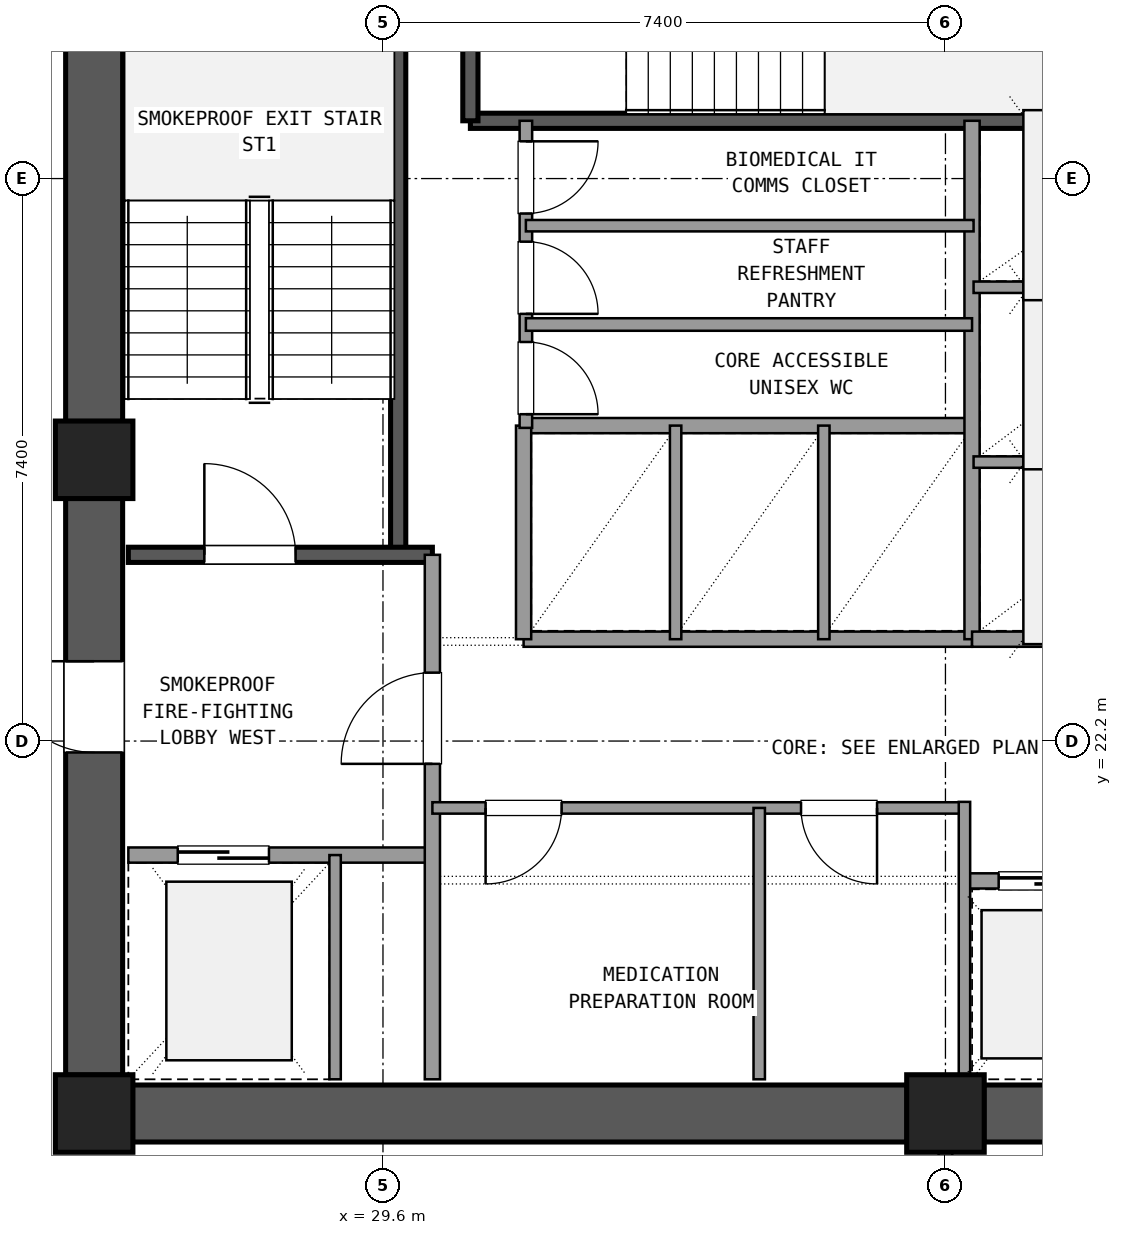
"""IFC4 building model, lengths in metres.
Left out: names, types, materials, properties, quantities, classifications, styles, units other than length and angle.
Written with IfcOpenShell. Run it as: python <this file> out.ifc"""

import sys

from ifc_helpers import new_model, si_unit, direction, frame, frame_2d, origin, origin_2d, place, context, subcontext, project, spatial, rectangle, extrude, element, fill, save


model = new_model("IFC4")
c1 = context("Model", 3, precision=1e-05, world=origin(), true_north=direction((0.0, 1.0)))
c2 = subcontext(c1, "Body", "Model", "MODEL_VIEW")
j1 = project(units=[si_unit("LENGTHUNIT", "METRE"), si_unit("PLANEANGLEUNIT", "RADIAN")], contexts=[c1])
p1 = place(None, origin())
s1 = spatial("IfcSite", under=j1, at=p1, CompositionType="ELEMENT")
p2 = place(p1, origin())
s2 = spatial("IfcBuilding", under=s1, at=p2, CompositionType="ELEMENT")
p3 = place(p2, frame((0.0, 0.0, 142.02)))
s3 = spatial("IfcBuildingStorey", under=s2, at=p3, CompositionType="ELEMENT", Elevation=142.02)
for number, where, z_axis, x_axis in (
    (1, (25.8, 17.3, 0.0), (0.0, 0.0, 1.0), (1.0, 0.0, 0.0)),
    (2, (37.0, 17.3, 0.0), (0.0, 0.0, 1.0), (1.0, 0.0, 0.0)),
    (3, (25.8, 25.9, 0.0), (0.0, 0.0, 1.0), (1.0, 0.0, 0.0)),
):
    element("IfcColumn", number, at=place(p3, frame(where, z_axis=z_axis, x_axis=x_axis)), inside=s3, PredefinedType="COLUMN", context=c2, shape_type="SweptSolid", body=[
        extrude(rectangle(XDim=1.02, YDim=1.02, at=origin_2d()), origin(), (0.0, 0.0, 1.0), 3.6),
    ])
for number, where, z_axis, x_axis in (
    (4, (26.305, 17.3, 0.0), (0.0, 0.0, 1.0), (1.0, 0.0, 0.0)),
    (5, (37.505, 17.3, 0.0), (0.0, 0.0, 1.0), (1.0, 0.0, 0.0)),
):
    element("IfcWall", number, at=place(p3, frame(where, z_axis=z_axis, x_axis=x_axis)), inside=s3, PredefinedType="SHEAR", context=c2, shape_type="SweptSolid", body=[
        extrude(rectangle(XDim=10.19, YDim=0.75, at=frame_2d((5.095, 0.0))), origin(), (0.0, 0.0, 1.0), 3.32),
    ])
p4 = place(p3, frame((25.8, 33.995, 0.0), z_axis=(0.0, 0.0, 1.0), x_axis=(0.0, -1.0, 0.0)))
e6 = element("IfcWall", 6, at=p4, inside=s3, PredefinedType="SHEAR", context=c2, shape_type="SweptSolid", body=[
    extrude(rectangle(XDim=7.59, YDim=0.75, at=frame_2d((3.795, 0.0))), origin(), (0.0, 0.0, 1.0), 3.32),
])
p5 = place(p3, frame((25.8, 25.395, 0.0), z_axis=(0.0, 0.0, 1.0), x_axis=(0.0, -1.0, 0.0)))
e7 = element("IfcWall", 7, at=p5, inside=s3, PredefinedType="SHEAR", context=c2, shape_type="SweptSolid", body=[
    extrude(rectangle(XDim=7.59, YDim=0.75, at=frame_2d((3.795, 0.0))), origin(), (0.0, 0.0, 1.0), 3.32),
])
p6 = place(p5, frame((2.145, 0.0, 0.0)))
e8 = element("IfcOpeningElement", 8, at=p6, cuts=e7, PredefinedType="OPENING", context=c2, shape_type="SweptSolid", body=[
    extrude(rectangle(XDim=1.2, YDim=2.15, at=frame_2d((0.6, 1.075))), frame((0.0, 0.385, 0.0), z_axis=(0.0, -1.0, 0.0), x_axis=(1.0, 0.0, 0.0)), (0.0, 0.0, 1.0), 0.77),
])
p7 = place(p3, frame((29.8, 24.65, 0.0), z_axis=(0.0, 0.0, 1.0), x_axis=(0.0, 1.0, 0.0)))
e9 = element("IfcWall", 9, at=p7, inside=s3, PredefinedType="SHEAR", context=c2, shape_type="SweptSolid", body=[
    extrude(rectangle(XDim=9.4, YDim=0.2, at=frame_2d((4.7, 0.0))), origin(), (0.0, 0.0, 1.0), 3.32),
])
p8 = place(p3, frame((26.25, 24.65, 0.0), z_axis=(0.0, 0.0, 1.0), x_axis=(1.0, 0.0, 0.0)))
e10 = element("IfcWall", 10, at=p8, inside=s3, PredefinedType="SHEAR", context=c2, shape_type="SweptSolid", body=[
    extrude(rectangle(XDim=4.0, YDim=0.2, at=frame_2d((2.0, 0.0))), origin(), (0.0, 0.0, 1.0), 3.32),
])
p9 = place(p8, frame((1.0, 0.0, 0.0)))
e11 = element("IfcOpeningElement", 11, at=p9, cuts=e10, PredefinedType="OPENING", context=c2, shape_type="SweptSolid", body=[
    extrude(rectangle(XDim=1.2, YDim=2.15, at=frame_2d((0.6, 1.075))), frame((0.0, 0.11, 0.0), z_axis=(0.0, -1.0, 0.0), x_axis=(1.0, 0.0, 0.0)), (0.0, 0.0, 1.0), 0.22),
])
p10 = place(p3, frame((30.75, 30.36, 0.0), z_axis=(0.0, 0.0, 1.0), x_axis=(1.0, 0.0, 0.0)))
e12 = element("IfcWall", 12, at=p10, inside=s3, PredefinedType="SHEAR", context=c2, shape_type="SweptSolid", body=[
    extrude(rectangle(XDim=9.5, YDim=0.2, at=frame_2d((4.75, 0.0))), origin(), (0.0, 0.0, 1.0), 3.32),
])
p11 = place(p3, frame((30.75, 30.36, 0.0), z_axis=(0.0, 0.0, 1.0), x_axis=(0.0, 1.0, 0.0)))
e13 = element("IfcWall", 13, at=p11, inside=s3, PredefinedType="SHEAR", context=c2, shape_type="SweptSolid", body=[
    extrude(rectangle(XDim=3.69, YDim=0.2, at=frame_2d((1.845, 0.0))), origin(), (0.0, 0.0, 1.0), 3.32),
])
p12 = place(p3, frame((26.25, 20.7, 0.0), z_axis=(0.0, 0.0, 1.0), x_axis=(1.0, 0.0, 0.0)))
e14 = element("IfcWall", 14, at=p12, inside=s3, PredefinedType="SOLIDWALL", context=c2, shape_type="SweptSolid", body=[
    extrude(rectangle(XDim=4.0, YDim=0.2, at=frame_2d((2.0, 0.0))), origin(), (0.0, 0.0, 1.0), 2.61),
])
p13 = place(p12, frame((0.65, 0.0, 0.0)))
e15 = element("IfcOpeningElement", 15, at=p13, cuts=e14, PredefinedType="OPENING", context=c2, shape_type="SweptSolid", body=[
    extrude(rectangle(XDim=1.2, YDim=2.15, at=frame_2d((0.6, 1.075))), frame((0.0, 0.11, 0.0), z_axis=(0.0, -1.0, 0.0), x_axis=(1.0, 0.0, 0.0)), (0.0, 0.0, 1.0), 0.22),
])
p14 = place(p3, frame((30.25, 17.75, 0.0), z_axis=(0.0, 0.0, 1.0), x_axis=(0.0, 1.0, 0.0)))
e16 = element("IfcWall", 16, at=p14, inside=s3, PredefinedType="SOLIDWALL", context=c2, shape_type="SweptSolid", body=[
    extrude(rectangle(XDim=6.9, YDim=0.2, at=frame_2d((3.45, 0.0))), origin(), (0.0, 0.0, 1.0), 2.61),
])
p15 = place(p14, frame((4.15, 0.0, 0.0)))
e17 = element("IfcOpeningElement", 17, at=p15, cuts=e16, PredefinedType="OPENING", context=c2, shape_type="SweptSolid", body=[
    extrude(rectangle(XDim=1.2, YDim=2.15, at=frame_2d((0.6, 1.075))), frame((0.0, 0.11, 0.0), z_axis=(0.0, -1.0, 0.0), x_axis=(1.0, 0.0, 0.0)), (0.0, 0.0, 1.0), 0.22),
])
p16 = place(p3, frame((28.97, 17.75, 0.0), z_axis=(0.0, 0.0, 1.0), x_axis=(0.0, 1.0, 0.0)))
e18 = element("IfcWall", 18, at=p16, inside=s3, PredefinedType="PARTITIONING", context=c2, shape_type="SweptSolid", body=[
    extrude(rectangle(XDim=2.95, YDim=0.15, at=frame_2d((1.475, 0.0))), origin(), (0.0, 0.0, 1.0), 2.61),
])
p17 = place(p3, frame((30.25, 21.32, 0.0), z_axis=(0.0, 0.0, 1.0), x_axis=(1.0, 0.0, 0.0)))
e19 = element("IfcWall", 19, at=p17, inside=s3, PredefinedType="PARTITIONING", context=c2, shape_type="SweptSolid", body=[
    extrude(rectangle(XDim=7.0, YDim=0.15, at=frame_2d((3.5, 0.0))), origin(), (0.0, 0.0, 1.0), 2.61),
])
p18 = place(p17, frame((0.7, 0.0, 0.0)))
e20 = element("IfcOpeningElement", 20, at=p18, cuts=e19, PredefinedType="OPENING", context=c2, shape_type="SweptSolid", body=[
    extrude(rectangle(XDim=1.0, YDim=2.15, at=frame_2d((0.5, 1.075))), frame((0.0, 0.085, 0.0), z_axis=(0.0, -1.0, 0.0), x_axis=(1.0, 0.0, 0.0)), (0.0, 0.0, 1.0), 0.17),
])
p19 = place(p17, frame((4.85, 0.0, 0.0)))
e21 = element("IfcOpeningElement", 21, at=p19, cuts=e19, PredefinedType="OPENING", context=c2, shape_type="SweptSolid", body=[
    extrude(rectangle(XDim=1.0, YDim=2.15, at=frame_2d((0.5, 1.075))), frame((0.0, 0.085, 0.0), z_axis=(0.0, -1.0, 0.0), x_axis=(1.0, 0.0, 0.0)), (0.0, 0.0, 1.0), 0.17),
])
p20 = place(p3, frame((34.55, 17.75, 0.0), z_axis=(0.0, 0.0, 1.0), x_axis=(0.0, 1.0, 0.0)))
e22 = element("IfcWall", 22, at=p20, inside=s3, PredefinedType="PARTITIONING", context=c2, shape_type="SweptSolid", body=[
    extrude(rectangle(XDim=3.57, YDim=0.15, at=frame_2d((1.785, 0.0))), origin(), (0.0, 0.0, 1.0), 2.61),
])
p21 = place(p3, frame((37.25, 20.36, 0.0), z_axis=(0.0, 0.0, 1.0), x_axis=(1.0, 0.0, 0.0)))
e23 = element("IfcWall", 23, at=p21, inside=s3, PredefinedType="SOLIDWALL", context=c2, shape_type="SweptSolid", body=[
    extrude(rectangle(XDim=6.1, YDim=0.2, at=frame_2d((3.05, 0.0))), origin(), (0.0, 0.0, 1.0), 2.61),
])
p22 = place(p21, frame((0.45, 0.0, 0.0)))
e24 = element("IfcOpeningElement", 24, at=p22, cuts=e23, PredefinedType="OPENING", context=c2, shape_type="SweptSolid", body=[
    extrude(rectangle(XDim=1.1, YDim=2.15, at=frame_2d((0.55, 1.075))), frame((0.0, 0.11, 0.0), z_axis=(0.0, -1.0, 0.0), x_axis=(1.0, 0.0, 0.0)), (0.0, 0.0, 1.0), 0.22),
])
p23 = place(p21, frame((2.5, 0.0, 0.0)))
e25 = element("IfcOpeningElement", 25, at=p23, cuts=e23, PredefinedType="OPENING", context=c2, shape_type="SweptSolid", body=[
    extrude(rectangle(XDim=1.1, YDim=2.15, at=frame_2d((0.55, 1.075))), frame((0.0, 0.11, 0.0), z_axis=(0.0, -1.0, 0.0), x_axis=(1.0, 0.0, 0.0)), (0.0, 0.0, 1.0), 0.22),
])
p24 = place(p21, frame((4.55, 0.0, 0.0)))
e26 = element("IfcOpeningElement", 26, at=p24, cuts=e23, PredefinedType="OPENING", context=c2, shape_type="SweptSolid", body=[
    extrude(rectangle(XDim=1.1, YDim=2.15, at=frame_2d((0.55, 1.075))), frame((0.0, 0.11, 0.0), z_axis=(0.0, -1.0, 0.0), x_axis=(1.0, 0.0, 0.0)), (0.0, 0.0, 1.0), 0.22),
])
p25 = place(p3, frame((37.25, 17.75, 0.0), z_axis=(0.0, 0.0, 1.0), x_axis=(0.0, 1.0, 0.0)))
e27 = element("IfcWall", 27, at=p25, inside=s3, PredefinedType="PARTITIONING", context=c2, shape_type="SweptSolid", body=[
    extrude(rectangle(XDim=3.65, YDim=0.15, at=frame_2d((1.825, 0.0))), origin(), (0.0, 0.0, 1.0), 2.61),
])
for number, where, z_axis, x_axis in (
    (28, (31.45, 23.54, 0.0), (0.0, 0.0, 1.0), (1.0, 0.0, 0.0)),
    (29, (31.45, 26.35, 0.0), (0.0, 0.0, 1.0), (1.0, 0.0, 0.0)),
):
    element("IfcWall", number, at=place(p3, frame(where, z_axis=z_axis, x_axis=x_axis)), inside=s3, PredefinedType="SOLIDWALL", context=c2, shape_type="SweptSolid", body=[
        extrude(rectangle(XDim=5.9, YDim=0.2, at=frame_2d((2.95, 0.0))), origin(), (0.0, 0.0, 1.0), 2.61),
    ])
p26 = place(p3, frame((31.45, 23.54, 0.0), z_axis=(0.0, 0.0, 1.0), x_axis=(0.0, 1.0, 0.0)))
e30 = element("IfcWall", 30, at=p26, inside=s3, PredefinedType="SOLIDWALL", context=c2, shape_type="SweptSolid", body=[
    extrude(rectangle(XDim=2.81, YDim=0.2, at=frame_2d((1.405, 0.0))), origin(), (0.0, 0.0, 1.0), 2.61),
])
for number, where, z_axis, x_axis in (
    (31, (33.45, 23.54, 0.0), (0.0, 0.0, 1.0), (0.0, 1.0, 0.0)),
    (32, (35.4, 23.54, 0.0), (0.0, 0.0, 1.0), (0.0, 1.0, 0.0)),
):
    element("IfcWall", number, at=place(p3, frame(where, z_axis=z_axis, x_axis=x_axis)), inside=s3, PredefinedType="PARTITIONING", context=c2, shape_type="SweptSolid", body=[
        extrude(rectangle(XDim=2.81, YDim=0.15, at=frame_2d((1.405, 0.0))), origin(), (0.0, 0.0, 1.0), 2.61),
    ])
p27 = place(p3, frame((37.35, 23.54, 0.0), z_axis=(0.0, 0.0, 1.0), x_axis=(0.0, 1.0, 0.0)))
e33 = element("IfcWall", 33, at=p27, inside=s3, PredefinedType="SOLIDWALL", context=c2, shape_type="SweptSolid", body=[
    extrude(rectangle(XDim=6.82, YDim=0.2, at=frame_2d((3.41, 0.0))), origin(), (0.0, 0.0, 1.0), 2.61),
])
p28 = place(p3, frame((37.35, 23.54, 0.0), z_axis=(0.0, 0.0, 1.0), x_axis=(1.0, 0.0, 0.0)))
e34 = element("IfcWall", 34, at=p28, inside=s3, PredefinedType="SOLIDWALL", context=c2, shape_type="SweptSolid", body=[
    extrude(rectangle(XDim=3.05, YDim=0.2, at=frame_2d((1.525, 0.0))), origin(), (0.0, 0.0, 1.0), 2.61),
])
for number, where, z_axis, x_axis in (
    (35, (37.37, 25.87, 0.0), (0.0, 0.0, 1.0), (1.0, 0.0, 0.0)),
    (36, (37.37, 28.17, 0.0), (0.0, 0.0, 1.0), (1.0, 0.0, 0.0)),
):
    element("IfcWall", number, at=place(p3, frame(where, z_axis=z_axis, x_axis=x_axis)), inside=s3, PredefinedType="PARTITIONING", context=c2, shape_type="SweptSolid", body=[
        extrude(rectangle(XDim=3.01, YDim=0.15, at=frame_2d((1.505, 0.0))), origin(), (0.0, 0.0, 1.0), 2.61),
    ])
p29 = place(p3, frame((31.48, 26.32, 0.0), z_axis=(0.0, 0.0, 1.0), x_axis=(0.0, 1.0, 0.0)))
e37 = element("IfcWall", 37, at=p29, inside=s3, PredefinedType="PLUMBINGWALL", context=c2, shape_type="SweptSolid", body=[
    extrude(rectangle(XDim=4.04, YDim=0.165, at=frame_2d((2.02, 0.0))), origin(), (0.0, 0.0, 1.0), 2.61),
])
p30 = place(p29, frame((0.18, 0.0, 0.0)))
e38 = element("IfcOpeningElement", 38, at=p30, cuts=e37, PredefinedType="OPENING", context=c2, shape_type="SweptSolid", body=[
    extrude(rectangle(XDim=0.95, YDim=2.1, at=frame_2d((0.475, 1.05))), frame((0.0, 0.093, 0.0), z_axis=(0.0, -1.0, 0.0), x_axis=(1.0, 0.0, 0.0)), (0.0, 0.0, 1.0), 0.185),
])
p31 = place(p29, frame((1.5, 0.0, 0.0)))
e39 = element("IfcOpeningElement", 39, at=p31, cuts=e37, PredefinedType="OPENING", context=c2, shape_type="SweptSolid", body=[
    extrude(rectangle(XDim=0.95, YDim=2.1, at=frame_2d((0.475, 1.05))), frame((0.0, 0.093, 0.0), z_axis=(0.0, -1.0, 0.0), x_axis=(1.0, 0.0, 0.0)), (0.0, 0.0, 1.0), 0.185),
])
p32 = place(p29, frame((2.82, 0.0, 0.0)))
e40 = element("IfcOpeningElement", 40, at=p32, cuts=e37, PredefinedType="OPENING", context=c2, shape_type="SweptSolid", body=[
    extrude(rectangle(XDim=0.95, YDim=2.1, at=frame_2d((0.475, 1.05))), frame((0.0, 0.093, 0.0), z_axis=(0.0, -1.0, 0.0), x_axis=(1.0, 0.0, 0.0)), (0.0, 0.0, 1.0), 0.185),
])
p33 = place(p3, frame((31.48, 27.68, 0.0), z_axis=(0.0, 0.0, 1.0), x_axis=(1.0, 0.0, 0.0)))
e41 = element("IfcWall", 41, at=p33, inside=s3, PredefinedType="PLUMBINGWALL", context=c2, shape_type="SweptSolid", body=[
    extrude(rectangle(XDim=5.87, YDim=0.165, at=frame_2d((2.935, 0.0))), origin(), (0.0, 0.0, 1.0), 2.61),
])
p34 = place(p3, frame((31.48, 28.98, 0.0), z_axis=(0.0, 0.0, 1.0), x_axis=(1.0, 0.0, 0.0)))
e42 = element("IfcWall", 42, at=p34, inside=s3, PredefinedType="PARTITIONING", context=c2, shape_type="SweptSolid", body=[
    extrude(rectangle(XDim=5.89, YDim=0.15, at=frame_2d((2.945, 0.0))), origin(), (0.0, 0.0, 1.0), 2.61),
])
p35 = place(p3, frame((37.0, 13.64, 0.0), z_axis=(0.0, 0.0, 1.0), x_axis=(0.0, 1.0, 0.0)))
e43 = element("IfcWall", 43, at=p35, inside=s3, PredefinedType="PARTITIONING", context=c2, shape_type="SweptSolid", body=[
    extrude(rectangle(XDim=3.21, YDim=0.18, at=frame_2d((1.605, 0.0))), origin(), (0.0, 0.0, 1.0), 2.61),
])
p36 = place(p35, frame((0.605, 0.0, 0.0)))
e44 = element("IfcOpeningElement", 44, at=p36, cuts=e43, PredefinedType="OPENING", context=c2, shape_type="SweptSolid", body=[
    extrude(rectangle(XDim=2.0, YDim=2.2, at=frame_2d((1.0, 1.1))), frame((0.0, 0.1, 0.0), z_axis=(0.0, -1.0, 0.0), x_axis=(1.0, 0.0, 0.0)), (0.0, 0.0, 1.0), 0.2),
])
p37 = place(p9, origin())
e45 = element("IfcDoor", 45, at=p37, inside=s3, OperationType="SINGLE_SWING_LEFT", PredefinedType="DOOR", context=c2, shape_type="SweptSolid", body=[
    extrude(rectangle(XDim=1.2, YDim=2.15, at=frame_2d((0.6, 1.075))), frame((0.0, 0.025, 0.0), z_axis=(0.0, -1.0, 0.0), x_axis=(1.0, 0.0, 0.0)), (0.0, 0.0, 1.0), 0.05),
])
fill(e11, e45)
p38 = place(p13, origin())
e46 = element("IfcDoor", 46, at=p38, inside=s3, OperationType="SLIDING_TO_LEFT", PredefinedType="DOOR", context=c2, shape_type="SweptSolid", body=[
    extrude(rectangle(XDim=1.2, YDim=2.15, at=frame_2d((0.6, 1.075))), frame((0.0, 0.025, 0.0), z_axis=(0.0, -1.0, 0.0), x_axis=(1.0, 0.0, 0.0)), (0.0, 0.0, 1.0), 0.05),
])
fill(e15, e46)
p39 = place(p15, origin())
e47 = element("IfcDoor", 47, at=p39, inside=s3, OperationType="SINGLE_SWING_LEFT", PredefinedType="DOOR", context=c2, shape_type="SweptSolid", body=[
    extrude(rectangle(XDim=1.2, YDim=2.15, at=frame_2d((0.6, 1.075))), frame((0.0, 0.025, 0.0), z_axis=(0.0, -1.0, 0.0), x_axis=(1.0, 0.0, 0.0)), (0.0, 0.0, 1.0), 0.05),
])
fill(e17, e47)
p40 = place(p6, frame((1.2, 0.0, 0.0), z_axis=(0.0, 0.0, 1.0), x_axis=(-1.0, 0.0, 0.0)))
e48 = element("IfcDoor", 48, at=p40, inside=s3, OperationType="SINGLE_SWING_LEFT", PredefinedType="DOOR", context=c2, shape_type="SweptSolid", body=[
    extrude(rectangle(XDim=1.2, YDim=2.15, at=frame_2d((0.6, 1.075))), frame((0.0, 0.025, 0.0), z_axis=(0.0, -1.0, 0.0), x_axis=(1.0, 0.0, 0.0)), (0.0, 0.0, 1.0), 0.05),
])
fill(e8, e48)
p41 = place(p18, frame((1.0, 0.0, 0.0), z_axis=(0.0, 0.0, 1.0), x_axis=(-1.0, 0.0, 0.0)))
e49 = element("IfcDoor", 49, at=p41, inside=s3, OperationType="SINGLE_SWING_LEFT", PredefinedType="DOOR", context=c2, shape_type="SweptSolid", body=[
    extrude(rectangle(XDim=1.0, YDim=2.15, at=frame_2d((0.5, 1.075))), frame((0.0, 0.025, 0.0), z_axis=(0.0, -1.0, 0.0), x_axis=(1.0, 0.0, 0.0)), (0.0, 0.0, 1.0), 0.05),
])
fill(e20, e49)
p42 = place(p19, frame((1.0, 0.0, 0.0), z_axis=(0.0, 0.0, 1.0), x_axis=(-1.0, 0.0, 0.0)))
e50 = element("IfcDoor", 50, at=p42, inside=s3, OperationType="SINGLE_SWING_RIGHT", PredefinedType="DOOR", context=c2, shape_type="SweptSolid", body=[
    extrude(rectangle(XDim=1.0, YDim=2.15, at=frame_2d((0.5, 1.075))), frame((0.0, 0.025, 0.0), z_axis=(0.0, -1.0, 0.0), x_axis=(1.0, 0.0, 0.0)), (0.0, 0.0, 1.0), 0.05),
])
fill(e21, e50)
p43 = place(p22, origin())
e51 = element("IfcDoor", 51, at=p43, inside=s3, OperationType="SLIDING_TO_LEFT", PredefinedType="DOOR", context=c2, shape_type="SweptSolid", body=[
    extrude(rectangle(XDim=1.1, YDim=2.15, at=frame_2d((0.55, 1.075))), frame((0.0, 0.025, 0.0), z_axis=(0.0, -1.0, 0.0), x_axis=(1.0, 0.0, 0.0)), (0.0, 0.0, 1.0), 0.05),
])
fill(e24, e51)
p44 = place(p30, frame((0.95, 0.0, 0.0), z_axis=(0.0, 0.0, 1.0), x_axis=(-1.0, 0.0, 0.0)))
e52 = element("IfcDoor", 52, at=p44, inside=s3, OperationType="SINGLE_SWING_LEFT", PredefinedType="DOOR", context=c2, shape_type="SweptSolid", body=[
    extrude(rectangle(XDim=0.95, YDim=2.1, at=frame_2d((0.475, 1.05))), frame((0.0, 0.025, 0.0), z_axis=(0.0, -1.0, 0.0), x_axis=(1.0, 0.0, 0.0)), (0.0, 0.0, 1.0), 0.05),
])
fill(e38, e52)
p45 = place(p31, frame((0.95, 0.0, 0.0), z_axis=(0.0, 0.0, 1.0), x_axis=(-1.0, 0.0, 0.0)))
e53 = element("IfcDoor", 53, at=p45, inside=s3, OperationType="SINGLE_SWING_LEFT", PredefinedType="DOOR", context=c2, shape_type="SweptSolid", body=[
    extrude(rectangle(XDim=0.95, YDim=2.1, at=frame_2d((0.475, 1.05))), frame((0.0, 0.025, 0.0), z_axis=(0.0, -1.0, 0.0), x_axis=(1.0, 0.0, 0.0)), (0.0, 0.0, 1.0), 0.05),
])
fill(e39, e53)
p46 = place(p32, frame((0.95, 0.0, 0.0), z_axis=(0.0, 0.0, 1.0), x_axis=(-1.0, 0.0, 0.0)))
e54 = element("IfcDoor", 54, at=p46, inside=s3, OperationType="SINGLE_SWING_RIGHT", PredefinedType="DOOR", context=c2, shape_type="SweptSolid", body=[
    extrude(rectangle(XDim=0.95, YDim=2.1, at=frame_2d((0.475, 1.05))), frame((0.0, 0.025, 0.0), z_axis=(0.0, -1.0, 0.0), x_axis=(1.0, 0.0, 0.0)), (0.0, 0.0, 1.0), 0.05),
])
fill(e40, e54)
save(model, sys.argv[1])
